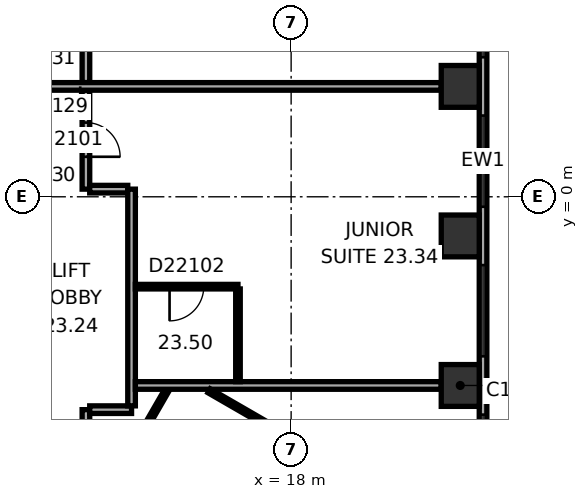
"""IFC4 building model, lengths in metres.
Left out: names, types, materials, properties, quantities, classifications, styles, units other than length and angle.
Written with IfcOpenShell. Run it as: python <this file> out.ifc"""

import sys

from ifc_helpers import new_model, si_unit, direction, frame, frame_2d, origin, origin_2d, place, context, subcontext, project, spatial, rectangle, extrude, element, fill, save


model = new_model("IFC4")
c1 = context("Model", 3, precision=1e-05, world=origin(), true_north=direction((0.0, 1.0)))
c2 = subcontext(c1, "Body", "Model", "MODEL_VIEW")
j1 = project(units=[si_unit("LENGTHUNIT", "METRE"), si_unit("PLANEANGLEUNIT", "RADIAN")], contexts=[c1])
p1 = place(None, origin())
s1 = spatial("IfcSite", under=j1, at=p1, CompositionType="ELEMENT")
p2 = place(p1, origin())
s2 = spatial("IfcBuilding", under=s1, at=p2, CompositionType="ELEMENT")
p3 = place(p2, frame((0.0, 0.0, 100.1)))
s3 = spatial("IfcBuildingStorey", under=s2, at=p3, CompositionType="ELEMENT", Elevation=100.1)
for number, where, z_axis, x_axis in (
    (1, (22.45, -4.965, 0.0), (0.0, 0.0, 1.0), (0.0, 1.0, 0.0)),
    (2, (22.45, -1.03, 0.0), (0.0, 0.0, 1.0), (0.0, 1.0, 0.0)),
    (3, (22.45, 2.905, 0.0), (0.0, 0.0, 1.0), (0.0, 1.0, 0.0)),
):
    element("IfcColumn", number, at=place(p3, frame(where, z_axis=z_axis, x_axis=x_axis)), inside=s3, PredefinedType="COLUMN", context=c2, shape_type="SweptSolid", body=[
        extrude(rectangle(XDim=1.1, YDim=1.0, at=origin_2d()), origin(), (0.0, 0.0, 1.0), 3.3),
    ])
p4 = place(p3, frame((23.05, -9.687, 0.0), z_axis=(0.0, 0.0, 1.0), x_axis=(0.0, 1.0, 0.0)))
e4 = element("IfcWall", 4, at=p4, inside=s3, PredefinedType="STANDARD", context=c2, shape_type="SweptSolid", body=[
    extrude(rectangle(XDim=21.246, YDim=0.2, at=frame_2d((10.623, 0.0))), origin(), (0.0, 0.0, 1.0), 3.3),
])
p5 = place(p4, frame((1.555, 0.0, 0.8)))
e5 = element("IfcOpeningElement", 5, at=p5, cuts=e4, PredefinedType="OPENING", context=c2, shape_type="SweptSolid", body=[
    extrude(rectangle(XDim=2.4, YDim=1.7, at=frame_2d((1.2, 0.85))), frame((0.0, 0.11, 0.0), z_axis=(0.0, -1.0, 0.0), x_axis=(1.0, 0.0, 0.0)), (0.0, 0.0, 1.0), 0.22),
])
p6 = place(p4, frame((5.489, 0.0, 0.8)))
e6 = element("IfcOpeningElement", 6, at=p6, cuts=e4, PredefinedType="OPENING", context=c2, shape_type="SweptSolid", body=[
    extrude(rectangle(XDim=2.4, YDim=1.7, at=frame_2d((1.2, 0.85))), frame((0.0, 0.11, 0.0), z_axis=(0.0, -1.0, 0.0), x_axis=(1.0, 0.0, 0.0)), (0.0, 0.0, 1.0), 0.22),
])
p7 = place(p4, frame((9.424, 0.0, 0.8)))
e7 = element("IfcOpeningElement", 7, at=p7, cuts=e4, PredefinedType="OPENING", context=c2, shape_type="SweptSolid", body=[
    extrude(rectangle(XDim=2.4, YDim=1.7, at=frame_2d((1.2, 0.85))), frame((0.0, 0.11, 0.0), z_axis=(0.0, -1.0, 0.0), x_axis=(1.0, 0.0, 0.0)), (0.0, 0.0, 1.0), 0.22),
])
p8 = place(p4, frame((13.358, 0.0, 0.8)))
e8 = element("IfcOpeningElement", 8, at=p8, cuts=e4, PredefinedType="OPENING", context=c2, shape_type="SweptSolid", body=[
    extrude(rectangle(XDim=2.4, YDim=1.7, at=frame_2d((1.2, 0.85))), frame((0.0, 0.11, 0.0), z_axis=(0.0, -1.0, 0.0), x_axis=(1.0, 0.0, 0.0)), (0.0, 0.0, 1.0), 0.22),
])
p9 = place(p4, frame((17.293, 0.0, 0.8)))
e9 = element("IfcOpeningElement", 9, at=p9, cuts=e4, PredefinedType="OPENING", context=c2, shape_type="SweptSolid", body=[
    extrude(rectangle(XDim=2.4, YDim=1.7, at=frame_2d((1.2, 0.85))), frame((0.0, 0.11, 0.0), z_axis=(0.0, -1.0, 0.0), x_axis=(1.0, 0.0, 0.0)), (0.0, 0.0, 1.0), 0.22),
])
p10 = place(p3, frame((12.6, -6.138, 0.0), z_axis=(0.0, 0.0, 1.0), x_axis=(0.0, 1.0, 0.0)))
e10 = element("IfcWall", 10, at=p10, inside=s3, PredefinedType="PARTITIONING", context=c2, shape_type="SweptSolid", body=[
    extrude(rectangle(XDim=0.537, YDim=0.2, at=frame_2d((0.268, 0.0))), origin(), (0.0, 0.0, 1.0), 3.05),
])
p11 = place(p3, frame((12.6, 0.201, 0.0), z_axis=(0.0, 0.0, 1.0), x_axis=(0.0, 1.0, 0.0)))
e11 = element("IfcWall", 11, at=p11, inside=s3, PredefinedType="PARTITIONING", context=c2, shape_type="SweptSolid", body=[
    extrude(rectangle(XDim=2.604, YDim=0.2, at=frame_2d((1.302, 0.0))), origin(), (0.0, 0.0, 1.0), 3.05),
])
p12 = place(p11, frame((0.852, 0.0, 0.0)))
e12 = element("IfcOpeningElement", 12, at=p12, cuts=e11, PredefinedType="OPENING", context=c2, shape_type="SweptSolid", body=[
    extrude(rectangle(XDim=0.9, YDim=2.1, at=frame_2d((0.45, 1.05))), frame((0.0, 0.11, 0.0), z_axis=(0.0, -1.0, 0.0), x_axis=(1.0, 0.0, 0.0)), (0.0, 0.0, 1.0), 0.22),
])
p13 = place(p3, frame((12.6, 3.004, 0.0), z_axis=(0.0, 0.0, 1.0), x_axis=(0.0, 1.0, 0.0)))
e13 = element("IfcWall", 13, at=p13, inside=s3, PredefinedType="PARTITIONING", context=c2, shape_type="SweptSolid", body=[
    extrude(rectangle(XDim=3.173, YDim=0.2, at=frame_2d((1.586, 0.0))), origin(), (0.0, 0.0, 1.0), 3.05),
])
p14 = place(p13, frame((1.136, 0.0, 0.0)))
e14 = element("IfcOpeningElement", 14, at=p14, cuts=e13, PredefinedType="OPENING", context=c2, shape_type="SweptSolid", body=[
    extrude(rectangle(XDim=0.9, YDim=2.1, at=frame_2d((0.45, 1.05))), frame((0.0, 0.11, 0.0), z_axis=(0.0, -1.0, 0.0), x_axis=(1.0, 0.0, 0.0)), (0.0, 0.0, 1.0), 0.22),
])
p15 = place(p3, frame((12.7, -5.601, 0.0), z_axis=(0.0, 0.0, 1.0), x_axis=(1.0, 0.0, 0.0)))
e15 = element("IfcWall", 15, at=p15, inside=s3, PredefinedType="PARTITIONING", context=c2, shape_type="SweptSolid", body=[
    extrude(rectangle(XDim=1.101, YDim=0.2, at=frame_2d((0.551, 0.0))), origin(), (0.0, 0.0, 1.0), 3.05),
])
p16 = place(p3, frame((13.701, 0.201, 0.0), z_axis=(0.0, 0.0, 1.0), x_axis=(-1.0, 0.0, 0.0)))
e16 = element("IfcWall", 16, at=p16, inside=s3, PredefinedType="PARTITIONING", context=c2, shape_type="SweptSolid", body=[
    extrude(rectangle(XDim=1.001, YDim=0.2, at=frame_2d((0.5, 0.0))), origin(), (0.0, 0.0, 1.0), 3.05),
])
p17 = place(p3, frame((13.801, -5.501, 0.0), z_axis=(0.0, 0.0, 1.0), x_axis=(0.0, 1.0, 0.0)))
e17 = element("IfcWall", 17, at=p17, inside=s3, PredefinedType="PARTITIONING", context=c2, shape_type="SweptSolid", body=[
    extrude(rectangle(XDim=5.702, YDim=0.2, at=frame_2d((2.851, 0.0))), origin(), (0.0, 0.0, 1.0), 3.05),
])
p18 = place(p3, frame((13.901, -6.524, 0.0), z_axis=(0.0, 0.0, 1.0), x_axis=(0.499964162598, 0.86604609353, 0.0)))
e18 = element("IfcWall", 18, at=p18, inside=s3, PredefinedType="PARTITIONING", context=c2, shape_type="SweptSolid", body=[
    extrude(rectangle(XDim=1.661, YDim=0.12, at=frame_2d((0.831, 0.0))), origin(), (0.0, 0.0, 1.0), 3.05),
])
p19 = place(p3, frame((13.901, -4.965, 0.0), z_axis=(0.0, 0.0, 1.0), x_axis=(1.0, 0.0, 0.0)))
e19 = element("IfcWall", 19, at=p19, inside=s3, PredefinedType="PARTITIONING", context=c2, shape_type="SweptSolid", body=[
    extrude(rectangle(XDim=8.049, YDim=0.2, at=frame_2d((4.024, 0.0))), origin(), (0.0, 0.0, 1.0), 3.05),
])
p20 = place(p3, frame((13.901, -2.365, 0.0), z_axis=(0.0, 0.0, 1.0), x_axis=(1.0, 0.0, 0.0)))
e20 = element("IfcWall", 20, at=p20, inside=s3, PredefinedType="PARTITIONING", context=c2, shape_type="SweptSolid", body=[
    extrude(rectangle(XDim=2.7, YDim=0.12, at=frame_2d((1.35, 0.0))), origin(), (0.0, 0.0, 1.0), 3.05),
])
p21 = place(p20, frame((0.9, 0.0, 0.0)))
e21 = element("IfcOpeningElement", 21, at=p21, cuts=e20, PredefinedType="OPENING", context=c2, shape_type="SweptSolid", body=[
    extrude(rectangle(XDim=0.9, YDim=2.1, at=frame_2d((0.45, 1.05))), frame((0.0, 0.07, 0.0), z_axis=(0.0, -1.0, 0.0), x_axis=(1.0, 0.0, 0.0)), (0.0, 0.0, 1.0), 0.14),
])
p22 = place(p3, frame((15.841, -5.104, 0.0), z_axis=(0.0, 0.0, 1.0), x_axis=(0.866025591402, -0.499999675036, 0.0)))
e22 = element("IfcWall", 22, at=p22, inside=s3, PredefinedType="PARTITIONING", context=c2, shape_type="SweptSolid", body=[
    extrude(rectangle(XDim=1.83, YDim=0.12, at=frame_2d((0.915, 0.0))), origin(), (0.0, 0.0, 1.0), 3.05),
])
p23 = place(p3, frame((16.601, -2.425, 0.0), z_axis=(0.0, 0.0, 1.0), x_axis=(0.0, -1.0, 0.0)))
e23 = element("IfcWall", 23, at=p23, inside=s3, PredefinedType="PARTITIONING", context=c2, shape_type="SweptSolid", body=[
    extrude(rectangle(XDim=2.44, YDim=0.12, at=frame_2d((1.22, 0.0))), origin(), (0.0, 0.0, 1.0), 3.05),
])
p24 = place(p3, frame((21.95, 2.905, 0.0), z_axis=(0.0, 0.0, 1.0), x_axis=(-1.0, 0.0, 0.0)))
e24 = element("IfcWall", 24, at=p24, inside=s3, PredefinedType="PARTITIONING", context=c2, shape_type="SweptSolid", body=[
    extrude(rectangle(XDim=11.25, YDim=0.2, at=frame_2d((5.625, 0.0))), origin(), (0.0, 0.0, 1.0), 3.05),
])
p25 = place(p24, frame((9.5, 0.0, 0.0)))
e25 = element("IfcOpeningElement", 25, at=p25, cuts=e24, PredefinedType="OPENING", context=c2, shape_type="SweptSolid", body=[
    extrude(rectangle(XDim=1.6, YDim=2.1, at=frame_2d((0.8, 1.05))), frame((0.0, 0.11, 0.0), z_axis=(0.0, -1.0, 0.0), x_axis=(1.0, 0.0, 0.0)), (0.0, 0.0, 1.0), 0.22),
])
p26 = place(p5, origin())
e26 = element("IfcWindow", 26, at=p26, inside=s3, PartitioningType="SINGLE_PANEL", PredefinedType="WINDOW", context=c2, shape_type="SweptSolid", body=[
    extrude(rectangle(XDim=2.4, YDim=1.7, at=frame_2d((1.2, 0.85))), frame((0.0, 0.03, 0.0), z_axis=(0.0, -1.0, 0.0), x_axis=(1.0, 0.0, 0.0)), (0.0, 0.0, 1.0), 0.06),
])
fill(e5, e26)
p27 = place(p6, origin())
e27 = element("IfcWindow", 27, at=p27, inside=s3, PartitioningType="SINGLE_PANEL", PredefinedType="WINDOW", context=c2, shape_type="SweptSolid", body=[
    extrude(rectangle(XDim=2.4, YDim=1.7, at=frame_2d((1.2, 0.85))), frame((0.0, 0.03, 0.0), z_axis=(0.0, -1.0, 0.0), x_axis=(1.0, 0.0, 0.0)), (0.0, 0.0, 1.0), 0.06),
])
fill(e6, e27)
p28 = place(p7, origin())
e28 = element("IfcWindow", 28, at=p28, inside=s3, PartitioningType="SINGLE_PANEL", PredefinedType="WINDOW", context=c2, shape_type="SweptSolid", body=[
    extrude(rectangle(XDim=2.4, YDim=1.7, at=frame_2d((1.2, 0.85))), frame((0.0, 0.03, 0.0), z_axis=(0.0, -1.0, 0.0), x_axis=(1.0, 0.0, 0.0)), (0.0, 0.0, 1.0), 0.06),
])
fill(e7, e28)
p29 = place(p8, origin())
e29 = element("IfcWindow", 29, at=p29, inside=s3, PartitioningType="SINGLE_PANEL", PredefinedType="WINDOW", context=c2, shape_type="SweptSolid", body=[
    extrude(rectangle(XDim=2.4, YDim=1.7, at=frame_2d((1.2, 0.85))), frame((0.0, 0.03, 0.0), z_axis=(0.0, -1.0, 0.0), x_axis=(1.0, 0.0, 0.0)), (0.0, 0.0, 1.0), 0.06),
])
fill(e8, e29)
p30 = place(p12, origin())
e30 = element("IfcDoor", 30, at=p30, inside=s3, OperationType="SINGLE_SWING_LEFT", PredefinedType="DOOR", context=c2, shape_type="SweptSolid", body=[
    extrude(rectangle(XDim=0.9, YDim=2.1, at=frame_2d((0.45, 1.05))), frame((0.0, 0.025, 0.0), z_axis=(0.0, -1.0, 0.0), x_axis=(1.0, 0.0, 0.0)), (0.0, 0.0, 1.0), 0.05),
])
fill(e12, e30)
p31 = place(p21, origin())
e31 = element("IfcDoor", 31, at=p31, inside=s3, OperationType="SINGLE_SWING_LEFT", PredefinedType="DOOR", context=c2, shape_type="SweptSolid", body=[
    extrude(rectangle(XDim=0.9, YDim=2.1, at=frame_2d((0.45, 1.05))), frame((0.0, 0.025, 0.0), z_axis=(0.0, -1.0, 0.0), x_axis=(1.0, 0.0, 0.0)), (0.0, 0.0, 1.0), 0.05),
])
fill(e21, e31)
p32 = place(p25, origin())
e32 = element("IfcDoor", 32, at=p32, inside=s3, OperationType="DOUBLE_DOOR_SINGLE_SWING", PredefinedType="DOOR", context=c2, shape_type="SweptSolid", body=[
    extrude(rectangle(XDim=1.6, YDim=2.1, at=frame_2d((0.8, 1.05))), frame((0.0, 0.025, 0.0), z_axis=(0.0, -1.0, 0.0), x_axis=(1.0, 0.0, 0.0)), (0.0, 0.0, 1.0), 0.05),
])
fill(e25, e32)
save(model, sys.argv[1])
